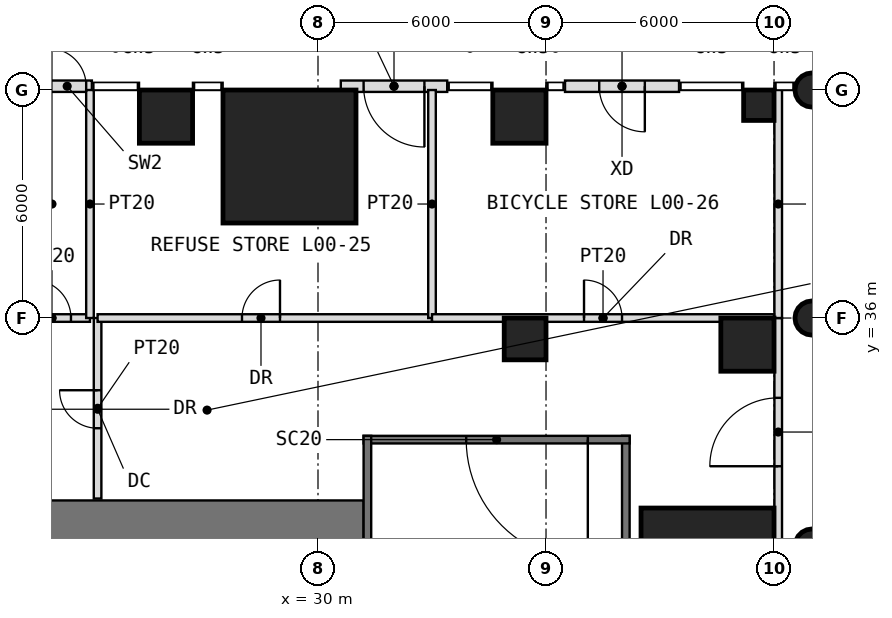
"""IFC4 building model, lengths in metres.
Left out: names, types, materials, properties, quantities, classifications, styles, units other than length and angle.
Written with IfcOpenShell. Run it as: python <this file> out.ifc"""

import sys

from ifc_helpers import new_model, si_unit, direction, frame, frame_2d, origin, origin_2d, place, context, subcontext, project, spatial, rectangle, circle, extrude, element, fill, save


model = new_model("IFC4")
c1 = context("Model", 3, precision=1e-05, world=origin(), true_north=direction((0.0, 1.0)))
c2 = subcontext(c1, "Body", "Model", "MODEL_VIEW")
j1 = project(units=[si_unit("LENGTHUNIT", "METRE"), si_unit("PLANEANGLEUNIT", "RADIAN")], contexts=[c1])
p1 = place(None, origin())
s1 = spatial("IfcSite", under=j1, at=p1, CompositionType="ELEMENT")
p2 = place(p1, origin())
s2 = spatial("IfcBuilding", under=s1, at=p2, CompositionType="ELEMENT")
p3 = place(p2, origin())
s3 = spatial("IfcBuildingStorey", under=s2, at=p3, CompositionType="ELEMENT", Elevation=0.0)
p4 = place(p3, frame((43.0, 30.0, -0.4), z_axis=(0.0, 0.0, 1.0), x_axis=(1.0, 0.0, 0.0)))
e1 = element("IfcColumn", 1, at=p4, inside=s3, PredefinedType="COLUMN", context=c2, shape_type="SweptSolid", body=[
    extrude(circle(Radius=0.45, at=origin_2d()), origin(), (0.0, 0.0, 1.0), 6.4),
])
p5 = place(p3, frame((40.25, 29.25, -0.4), z_axis=(0.0, 0.0, 1.0), x_axis=(1.0, 0.0, 0.0)))
e2 = element("IfcColumn", 2, at=p5, inside=s3, PredefinedType="COLUMN", context=c2, shape_type="SweptSolid", body=[
    extrude(rectangle(XDim=3.5, YDim=3.5, at=origin_2d()), origin(), (0.0, 0.0, 1.0), 6.4),
])
p6 = place(p3, frame((35.45, 35.45, -0.4), z_axis=(0.0, 0.0, 1.0), x_axis=(1.0, 0.0, 0.0)))
e3 = element("IfcColumn", 3, at=p6, inside=s3, PredefinedType="COLUMN", context=c2, shape_type="SweptSolid", body=[
    extrude(rectangle(XDim=1.1, YDim=1.1, at=origin_2d()), origin(), (0.0, 0.0, 1.0), 6.4),
])
p7 = place(p3, frame((41.3, 35.3, -0.4), z_axis=(0.0, 0.0, 1.0), x_axis=(1.0, 0.0, 0.0)))
e4 = element("IfcColumn", 4, at=p7, inside=s3, PredefinedType="COLUMN", context=c2, shape_type="SweptSolid", body=[
    extrude(rectangle(XDim=1.4, YDim=1.4, at=origin_2d()), origin(), (0.0, 0.0, 1.0), 6.4),
])
p8 = place(p3, frame((43.0, 36.0, -0.4), z_axis=(0.0, 0.0, 1.0), x_axis=(1.0, 0.0, 0.0)))
e5 = element("IfcColumn", 5, at=p8, inside=s3, PredefinedType="COLUMN", context=c2, shape_type="SweptSolid", body=[
    extrude(circle(Radius=0.45, at=origin_2d()), origin(), (0.0, 0.0, 1.0), 6.4),
])
p9 = place(p3, frame((26.0, 41.3, -0.4), z_axis=(0.0, 0.0, 1.0), x_axis=(1.0, 0.0, 0.0)))
e6 = element("IfcColumn", 6, at=p9, inside=s3, PredefinedType="COLUMN", context=c2, shape_type="SweptSolid", body=[
    extrude(rectangle(XDim=1.4, YDim=1.4, at=origin_2d()), origin(), (0.0, 0.0, 1.0), 6.4),
])
p10 = place(p3, frame((29.25, 40.25, -0.4), z_axis=(0.0, 0.0, 1.0), x_axis=(1.0, 0.0, 0.0)))
e7 = element("IfcColumn", 7, at=p10, inside=s3, PredefinedType="COLUMN", context=c2, shape_type="SweptSolid", body=[
    extrude(rectangle(XDim=3.5, YDim=3.5, at=origin_2d()), origin(), (0.0, 0.0, 1.0), 6.4),
])
p11 = place(p3, frame((35.3, 41.3, -0.4), z_axis=(0.0, 0.0, 1.0), x_axis=(1.0, 0.0, 0.0)))
e8 = element("IfcColumn", 8, at=p11, inside=s3, PredefinedType="COLUMN", context=c2, shape_type="SweptSolid", body=[
    extrude(rectangle(XDim=1.4, YDim=1.4, at=origin_2d()), origin(), (0.0, 0.0, 1.0), 6.4),
])
p12 = place(p3, frame((41.6, 41.6, -0.4), z_axis=(0.0, 0.0, 1.0), x_axis=(1.0, 0.0, 0.0)))
e9 = element("IfcColumn", 9, at=p12, inside=s3, PredefinedType="COLUMN", context=c2, shape_type="SweptSolid", body=[
    extrude(rectangle(XDim=0.8, YDim=0.8, at=origin_2d()), origin(), (0.0, 0.0, 1.0), 6.4),
])
p13 = place(p3, frame((43.0, 42.0, -0.4), z_axis=(0.0, 0.0, 1.0), x_axis=(1.0, 0.0, 0.0)))
e10 = element("IfcColumn", 10, at=p13, inside=s3, PredefinedType="COLUMN", context=c2, shape_type="SweptSolid", body=[
    extrude(circle(Radius=0.45, at=origin_2d()), origin(), (0.0, 0.0, 1.0), 6.4),
])
p14 = place(p3, frame((39.5, 42.1, 0.0), z_axis=(0.0, 0.0, 1.0), x_axis=(-1.0, 0.0, 0.0)))
e11 = element("IfcWall", 11, at=p14, inside=s3, PredefinedType="USERDEFINED", context=c2, shape_type="SweptSolid", body=[
    extrude(rectangle(XDim=3.0, YDim=0.3, at=frame_2d((1.5, 0.0))), origin(), (0.0, 0.0, 1.0), 4.98),
])
p15 = place(p14, frame((0.9, 0.0, 0.0)))
e12 = element("IfcOpeningElement", 12, at=p15, cuts=e11, PredefinedType="OPENING", context=c2, shape_type="SweptSolid", body=[
    extrude(rectangle(XDim=1.2, YDim=2.4, at=frame_2d((0.6, 1.2))), frame((0.0, 0.16, 0.0), z_axis=(0.0, -1.0, 0.0), x_axis=(1.0, 0.0, 0.0)), (0.0, 0.0, 1.0), 0.32),
])
p16 = place(p3, frame((33.4, 42.1, 0.0), z_axis=(0.0, 0.0, 1.0), x_axis=(-1.0, 0.0, 0.0)))
e13 = element("IfcWall", 13, at=p16, inside=s3, PredefinedType="USERDEFINED", context=c2, shape_type="SweptSolid", body=[
    extrude(rectangle(XDim=2.8, YDim=0.3, at=frame_2d((1.4, 0.0))), origin(), (0.0, 0.0, 1.0), 5.6),
])
p17 = place(p16, frame((0.6, 0.0, 0.0)))
e14 = element("IfcOpeningElement", 14, at=p17, cuts=e13, PredefinedType="OPENING", context=c2, shape_type="SweptSolid", body=[
    extrude(rectangle(XDim=1.6, YDim=2.1, at=frame_2d((0.8, 1.05))), frame((0.0, 0.16, 0.0), z_axis=(0.0, -1.0, 0.0), x_axis=(1.0, 0.0, 0.0)), (0.0, 0.0, 1.0), 0.32),
])
p18 = place(p3, frame((22.75, 42.1, 0.0), z_axis=(0.0, 0.0, 1.0), x_axis=(1.0, 0.0, 0.0)))
e15 = element("IfcWall", 15, at=p18, inside=s3, PredefinedType="USERDEFINED", context=c2, shape_type="SweptSolid", body=[
    extrude(rectangle(XDim=1.3, YDim=0.3, at=frame_2d((0.65, 0.0))), origin(), (0.0, 0.0, 1.0), 5.6),
])
p19 = place(p18, frame((0.15, 0.0, 0.0)))
e16 = element("IfcOpeningElement", 16, at=p19, cuts=e15, PredefinedType="OPENING", context=c2, shape_type="SweptSolid", body=[
    extrude(rectangle(XDim=1.0, YDim=2.4, at=frame_2d((0.5, 1.2))), frame((0.0, 0.16, 0.0), z_axis=(0.0, -1.0, 0.0), x_axis=(1.0, 0.0, 0.0)), (0.0, 0.0, 1.0), 0.32),
])
p20 = place(p3, frame((10.8, 30.3, 0.0), z_axis=(0.0, 0.0, 1.0), x_axis=(1.0, 0.0, 0.0)))
e17 = element("IfcWall", 17, at=p20, inside=s3, PredefinedType="SHEAR", context=c2, shape_type="SweptSolid", body=[
    extrude(rectangle(XDim=20.4, YDim=1.8, at=frame_2d((10.2, 0.0))), origin(), (0.0, 0.0, 1.0), 5.8),
])
p21 = place(p20, frame((9.2, 0.0, 0.0)))
e18 = element("IfcOpeningElement", 18, at=p21, cuts=e17, PredefinedType="OPENING", context=c2, shape_type="SweptSolid", body=[
    extrude(rectangle(XDim=2.0, YDim=2.2, at=frame_2d((1.0, 1.1))), frame((0.0, 0.91, 0.0), z_axis=(0.0, -1.0, 0.0), x_axis=(1.0, 0.0, 0.0)), (0.0, 0.0, 1.0), 1.82),
])
p22 = place(p3, frame((38.1, 19.8, 0.0), z_axis=(0.0, 0.0, 1.0), x_axis=(0.0, 1.0, 0.0)))
e19 = element("IfcWall", 19, at=p22, inside=s3, PredefinedType="SOLIDWALL", context=c2, shape_type="SweptSolid", body=[
    extrude(rectangle(XDim=13.1, YDim=0.2, at=frame_2d((6.55, 0.0))), origin(), (0.0, 0.0, 1.0), 5.8),
])
p23 = place(p3, frame((38.2, 32.8, 0.0), z_axis=(0.0, 0.0, 1.0), x_axis=(-1.0, 0.0, 0.0)))
e20 = element("IfcWall", 20, at=p23, inside=s3, PredefinedType="SOLIDWALL", context=c2, shape_type="SweptSolid", body=[
    extrude(rectangle(XDim=7.0, YDim=0.2, at=frame_2d((3.5, 0.0))), origin(), (0.0, 0.0, 1.0), 5.8),
])
p24 = place(p23, frame((1.1, 0.0, 0.0)))
e21 = element("IfcOpeningElement", 21, at=p24, cuts=e20, PredefinedType="OPENING", context=c2, shape_type="SweptSolid", body=[
    extrude(rectangle(XDim=3.2, YDim=2.4, at=frame_2d((1.6, 1.2))), frame((0.0, 0.11, 0.0), z_axis=(0.0, -1.0, 0.0), x_axis=(1.0, 0.0, 0.0)), (0.0, 0.0, 1.0), 0.22),
])
p25 = place(p3, frame((31.3, 32.9, 0.0), z_axis=(0.0, 0.0, 1.0), x_axis=(0.0, -1.0, 0.0)))
e22 = element("IfcWall", 22, at=p25, inside=s3, PredefinedType="SOLIDWALL", context=c2, shape_type="SweptSolid", body=[
    extrude(rectangle(XDim=13.1, YDim=0.2, at=frame_2d((6.55, 0.0))), origin(), (0.0, 0.0, 1.0), 5.8),
])
p26 = place(p3, frame((42.11, 6.0, 0.0), z_axis=(0.0, 0.0, 1.0), x_axis=(0.0, 1.0, 0.0)))
e23 = element("IfcWall", 23, at=p26, inside=s3, PredefinedType="PARTITIONING", context=c2, shape_type="SweptSolid", body=[
    extrude(rectangle(XDim=30.0, YDim=0.2, at=frame_2d((15.0, 0.0))), origin(), (0.0, 0.0, 1.0), 5.6),
])
p27 = place(p26, frame((11.3, 0.0, 0.0)))
e24 = element("IfcOpeningElement", 24, at=p27, cuts=e23, PredefinedType="OPENING", context=c2, shape_type="SweptSolid", body=[
    extrude(rectangle(XDim=1.8, YDim=2.4, at=frame_2d((0.9, 1.2))), frame((0.0, 0.11, 0.0), z_axis=(0.0, -1.0, 0.0), x_axis=(1.0, 0.0, 0.0)), (0.0, 0.0, 1.0), 0.22),
])
p28 = place(p26, frame((26.1, 0.0, 0.0)))
e25 = element("IfcOpeningElement", 25, at=p28, cuts=e23, PredefinedType="OPENING", context=c2, shape_type="SweptSolid", body=[
    extrude(rectangle(XDim=1.8, YDim=2.4, at=frame_2d((0.9, 1.2))), frame((0.0, 0.11, 0.0), z_axis=(0.0, -1.0, 0.0), x_axis=(1.0, 0.0, 0.0)), (0.0, 0.0, 1.0), 0.22),
])
p29 = place(p3, frame((42.11, 36.0, 0.0), z_axis=(0.0, 0.0, 1.0), x_axis=(0.0, 1.0, 0.0)))
e26 = element("IfcWall", 26, at=p29, inside=s3, PredefinedType="PARTITIONING", context=c2, shape_type="SweptSolid", body=[
    extrude(rectangle(XDim=6.0, YDim=0.2, at=frame_2d((3.0, 0.0))), origin(), (0.0, 0.0, 1.0), 4.98),
])
p30 = place(p3, frame((22.0, 36.0, 0.0), z_axis=(0.0, 0.0, 1.0), x_axis=(1.0, 0.0, 0.0)))
e27 = element("IfcWall", 27, at=p30, inside=s3, PredefinedType="PARTITIONING", context=c2, shape_type="SweptSolid", body=[
    extrude(rectangle(XDim=2.0, YDim=0.2, at=frame_2d((1.0, 0.0))), origin(), (0.0, 0.0, 1.0), 5.6),
])
p31 = place(p30, frame((0.5, 0.0, 0.0)))
e28 = element("IfcOpeningElement", 28, at=p31, cuts=e27, PredefinedType="OPENING", context=c2, shape_type="SweptSolid", body=[
    extrude(rectangle(XDim=1.0, YDim=2.2, at=frame_2d((0.5, 1.1))), frame((0.0, 0.11, 0.0), z_axis=(0.0, -1.0, 0.0), x_axis=(1.0, 0.0, 0.0)), (0.0, 0.0, 1.0), 0.22),
])
p32 = place(p3, frame((24.0, 36.0, 0.0), z_axis=(0.0, 0.0, 1.0), x_axis=(0.0, 1.0, 0.0)))
e29 = element("IfcWall", 29, at=p32, inside=s3, PredefinedType="PARTITIONING", context=c2, shape_type="SweptSolid", body=[
    extrude(rectangle(XDim=6.0, YDim=0.2, at=frame_2d((3.0, 0.0))), origin(), (0.0, 0.0, 1.0), 5.6),
])
p33 = place(p3, frame((24.2, 31.25, 0.0), z_axis=(0.0, 0.0, 1.0), x_axis=(0.0, 1.0, 0.0)))
e30 = element("IfcWall", 30, at=p33, inside=s3, PredefinedType="PARTITIONING", context=c2, shape_type="SweptSolid", body=[
    extrude(rectangle(XDim=4.75, YDim=0.2, at=frame_2d((2.375, 0.0))), origin(), (0.0, 0.0, 1.0), 5.6),
])
p34 = place(p33, frame((1.85, 0.0, 0.0)))
e31 = element("IfcOpeningElement", 31, at=p34, cuts=e30, PredefinedType="OPENING", context=c2, shape_type="SweptSolid", body=[
    extrude(rectangle(XDim=1.0, YDim=2.2, at=frame_2d((0.5, 1.1))), frame((0.0, 0.11, 0.0), z_axis=(0.0, -1.0, 0.0), x_axis=(1.0, 0.0, 0.0)), (0.0, 0.0, 1.0), 0.22),
])
p35 = place(p3, frame((24.2, 36.0, 0.0), z_axis=(0.0, 0.0, 1.0), x_axis=(1.0, 0.0, 0.0)))
e32 = element("IfcWall", 32, at=p35, inside=s3, PredefinedType="PARTITIONING", context=c2, shape_type="SweptSolid", body=[
    extrude(rectangle(XDim=8.8, YDim=0.2, at=frame_2d((4.4, 0.0))), origin(), (0.0, 0.0, 1.0), 5.6),
])
p36 = place(p35, frame((3.8, 0.0, 0.0)))
e33 = element("IfcOpeningElement", 33, at=p36, cuts=e32, PredefinedType="OPENING", context=c2, shape_type="SweptSolid", body=[
    extrude(rectangle(XDim=1.0, YDim=2.2, at=frame_2d((0.5, 1.1))), frame((0.0, 0.11, 0.0), z_axis=(0.0, -1.0, 0.0), x_axis=(1.0, 0.0, 0.0)), (0.0, 0.0, 1.0), 0.22),
])
p37 = place(p3, frame((33.0, 36.0, 0.0), z_axis=(0.0, 0.0, 1.0), x_axis=(0.0, 1.0, 0.0)))
e34 = element("IfcWall", 34, at=p37, inside=s3, PredefinedType="PARTITIONING", context=c2, shape_type="SweptSolid", body=[
    extrude(rectangle(XDim=6.0, YDim=0.2, at=frame_2d((3.0, 0.0))), origin(), (0.0, 0.0, 1.0), 5.6),
])
p38 = place(p3, frame((33.0, 36.0, 0.0), z_axis=(0.0, 0.0, 1.0), x_axis=(1.0, 0.0, 0.0)))
e35 = element("IfcWall", 35, at=p38, inside=s3, PredefinedType="PARTITIONING", context=c2, shape_type="SweptSolid", body=[
    extrude(rectangle(XDim=9.0, YDim=0.2, at=frame_2d((4.5, 0.0))), origin(), (0.0, 0.0, 1.0), 5.6),
])
p39 = place(p38, frame((4.0, 0.0, 0.0)))
e36 = element("IfcOpeningElement", 36, at=p39, cuts=e35, PredefinedType="OPENING", context=c2, shape_type="SweptSolid", body=[
    extrude(rectangle(XDim=1.0, YDim=2.2, at=frame_2d((0.5, 1.1))), frame((0.0, 0.11, 0.0), z_axis=(0.0, -1.0, 0.0), x_axis=(1.0, 0.0, 0.0)), (0.0, 0.0, 1.0), 0.22),
])
p40 = place(p15, origin())
e37 = element("IfcDoor", 37, at=p40, inside=s3, OperationType="SINGLE_SWING_LEFT", PredefinedType="DOOR", context=c2, shape_type="SweptSolid", body=[
    extrude(rectangle(XDim=1.2, YDim=2.4, at=frame_2d((0.6, 1.2))), frame((0.0, 0.025, 0.0), z_axis=(0.0, -1.0, 0.0), x_axis=(1.0, 0.0, 0.0)), (0.0, 0.0, 1.0), 0.05),
])
fill(e12, e37)
p41 = place(p17, origin())
e38 = element("IfcDoor", 38, at=p41, inside=s3, OperationType="DOUBLE_DOOR_SINGLE_SWING", PredefinedType="DOOR", context=c2, shape_type="SweptSolid", body=[
    extrude(rectangle(XDim=1.6, YDim=2.1, at=frame_2d((0.8, 1.05))), frame((0.0, 0.025, 0.0), z_axis=(0.0, -1.0, 0.0), x_axis=(1.0, 0.0, 0.0)), (0.0, 0.0, 1.0), 0.05),
])
fill(e14, e38)
p42 = place(p19, origin())
e39 = element("IfcDoor", 39, at=p42, inside=s3, OperationType="SINGLE_SWING_LEFT", PredefinedType="DOOR", context=c2, shape_type="SweptSolid", body=[
    extrude(rectangle(XDim=1.0, YDim=2.4, at=frame_2d((0.5, 1.2))), frame((0.0, 0.025, 0.0), z_axis=(0.0, -1.0, 0.0), x_axis=(1.0, 0.0, 0.0)), (0.0, 0.0, 1.0), 0.05),
])
fill(e16, e39)
p43 = place(p24, origin())
e40 = element("IfcDoor", 40, at=p43, inside=s3, OperationType="DOUBLE_DOOR_SINGLE_SWING", PredefinedType="DOOR", context=c2, shape_type="SweptSolid", body=[
    extrude(rectangle(XDim=3.2, YDim=2.4, at=frame_2d((1.6, 1.2))), frame((0.0, 0.025, 0.0), z_axis=(0.0, -1.0, 0.0), x_axis=(1.0, 0.0, 0.0)), (0.0, 0.0, 1.0), 0.05),
])
fill(e21, e40)
p44 = place(p28, origin())
e41 = element("IfcDoor", 41, at=p44, inside=s3, OperationType="DOUBLE_DOOR_SINGLE_SWING", PredefinedType="DOOR", context=c2, shape_type="SweptSolid", body=[
    extrude(rectangle(XDim=1.8, YDim=2.4, at=frame_2d((0.9, 1.2))), frame((0.0, 0.025, 0.0), z_axis=(0.0, -1.0, 0.0), x_axis=(1.0, 0.0, 0.0)), (0.0, 0.0, 1.0), 0.05),
])
fill(e25, e41)
p45 = place(p31, origin())
e42 = element("IfcDoor", 42, at=p45, inside=s3, OperationType="SINGLE_SWING_LEFT", PredefinedType="DOOR", context=c2, shape_type="SweptSolid", body=[
    extrude(rectangle(XDim=1.0, YDim=2.2, at=frame_2d((0.5, 1.1))), frame((0.0, 0.025, 0.0), z_axis=(0.0, -1.0, 0.0), x_axis=(1.0, 0.0, 0.0)), (0.0, 0.0, 1.0), 0.05),
])
fill(e28, e42)
p46 = place(p36, origin())
e43 = element("IfcDoor", 43, at=p46, inside=s3, OperationType="SINGLE_SWING_RIGHT", PredefinedType="DOOR", context=c2, shape_type="SweptSolid", body=[
    extrude(rectangle(XDim=1.0, YDim=2.2, at=frame_2d((0.5, 1.1))), frame((0.0, 0.025, 0.0), z_axis=(0.0, -1.0, 0.0), x_axis=(1.0, 0.0, 0.0)), (0.0, 0.0, 1.0), 0.05),
])
fill(e33, e43)
p47 = place(p39, origin())
e44 = element("IfcDoor", 44, at=p47, inside=s3, OperationType="SINGLE_SWING_LEFT", PredefinedType="DOOR", context=c2, shape_type="SweptSolid", body=[
    extrude(rectangle(XDim=1.0, YDim=2.2, at=frame_2d((0.5, 1.1))), frame((0.0, 0.025, 0.0), z_axis=(0.0, -1.0, 0.0), x_axis=(1.0, 0.0, 0.0)), (0.0, 0.0, 1.0), 0.05),
])
fill(e36, e44)
p48 = place(p34, origin())
e45 = element("IfcDoor", 45, at=p48, inside=s3, OperationType="SINGLE_SWING_RIGHT", PredefinedType="DOOR", context=c2, shape_type="SweptSolid", body=[
    extrude(rectangle(XDim=1.0, YDim=2.2, at=frame_2d((0.5, 1.1))), frame((0.0, 0.025, 0.0), z_axis=(0.0, -1.0, 0.0), x_axis=(1.0, 0.0, 0.0)), (0.0, 0.0, 1.0), 0.05),
])
fill(e31, e45)
save(model, sys.argv[1])
